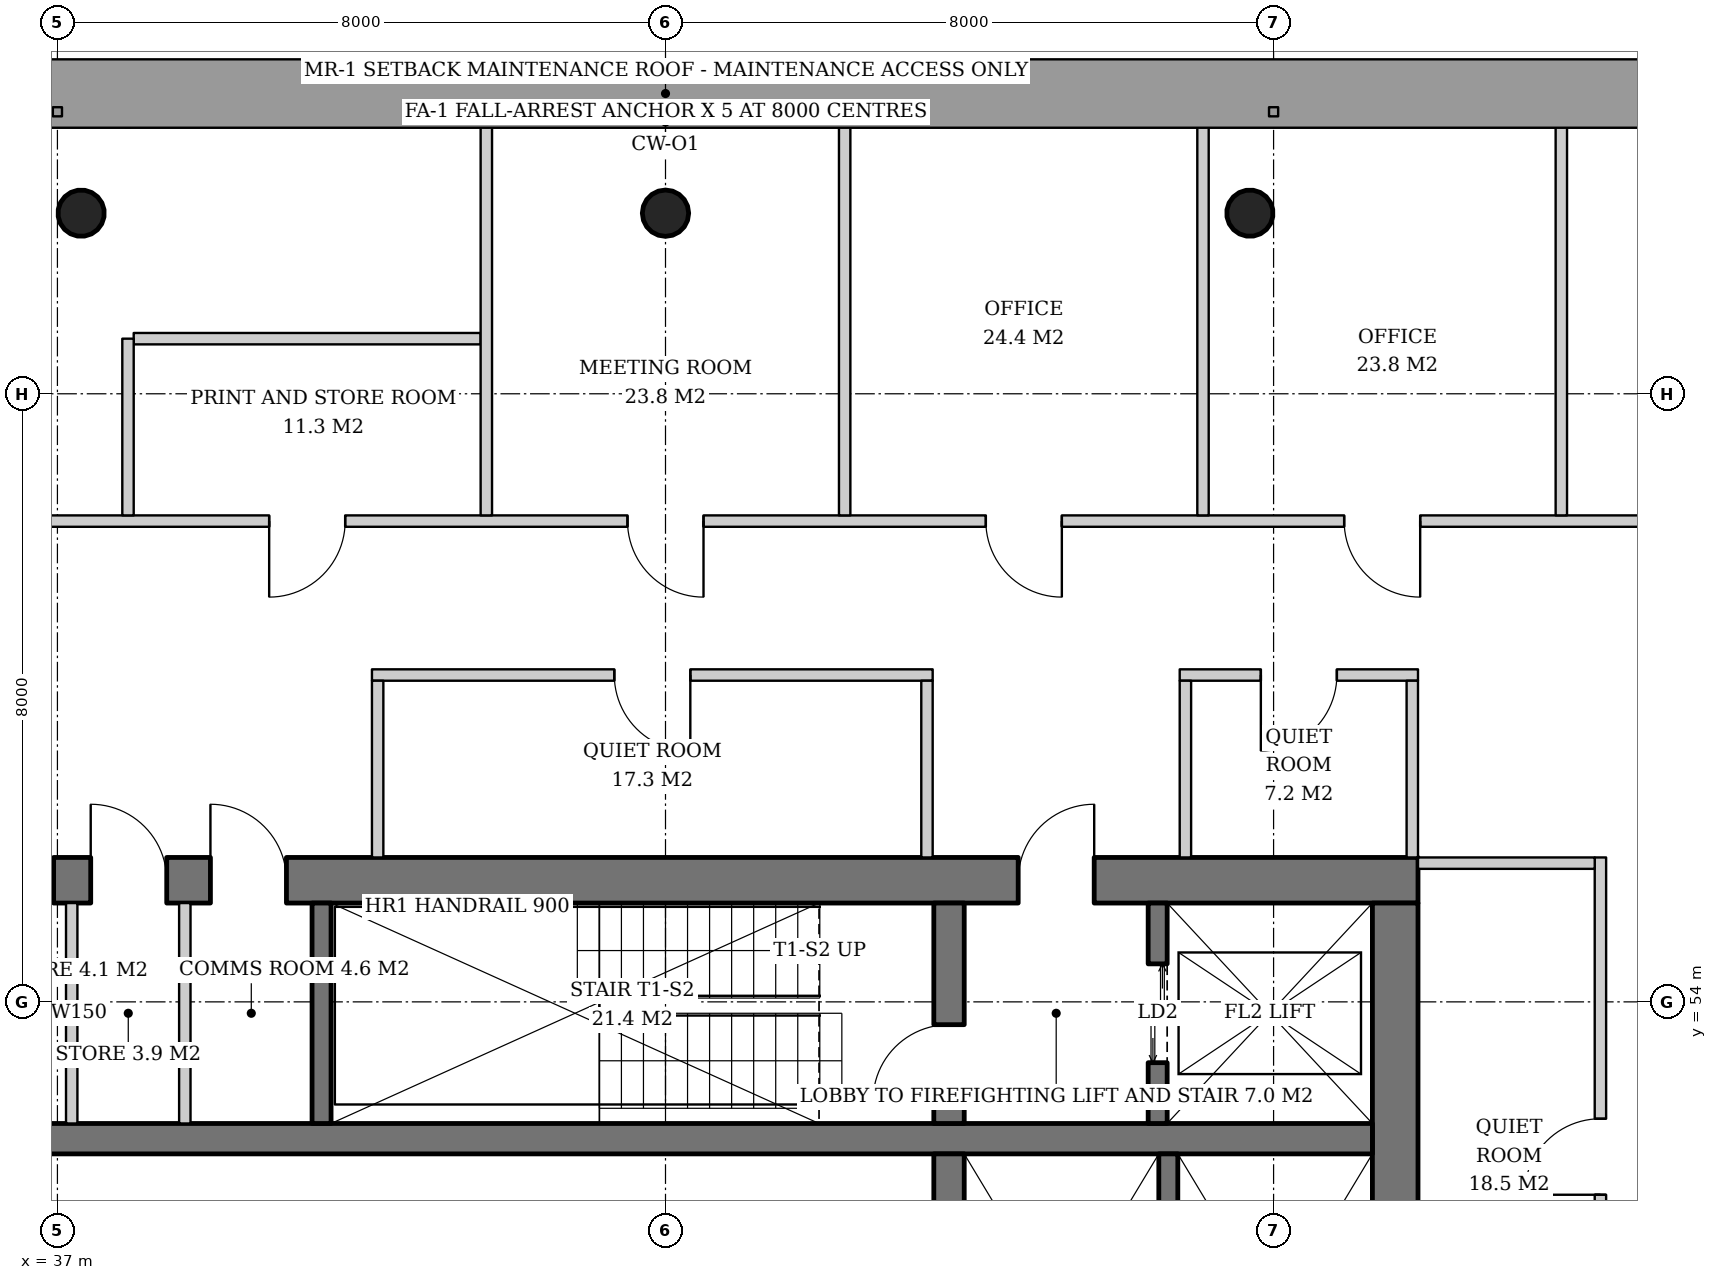
"""IFC4 building model, lengths in metres.
Left out: names, types, materials, properties, quantities, classifications, styles, units other than length and angle.
Written with IfcOpenShell. Run it as: python <this file> out.ifc"""

import sys

from ifc_helpers import new_model, si_unit, direction, frame, frame_2d, origin, origin_2d, place, context, subcontext, project, spatial, rectangle, hollow_circle, extrude, element, fill, save


model = new_model("IFC4")
c1 = context("Model", 3, precision=1e-05, world=origin(), true_north=direction((0.0, 1.0)))
c2 = subcontext(c1, "Body", "Model", "MODEL_VIEW")
j1 = project(units=[si_unit("LENGTHUNIT", "METRE"), si_unit("PLANEANGLEUNIT", "RADIAN")], contexts=[c1])
p1 = place(None, origin())
s1 = spatial("IfcSite", under=j1, at=p1, CompositionType="ELEMENT")
p2 = place(p1, origin())
s2 = spatial("IfcBuilding", under=s1, at=p2, CompositionType="ELEMENT")
p3 = place(p2, frame((0.0, 0.0, 195.8)))
s3 = spatial("IfcBuildingStorey", under=s2, at=p3, CompositionType="ELEMENT", Elevation=195.8)
p4 = place(p3, frame((59.314, 60.314, 0.0), z_axis=(-0.031898107953, -0.031898107953, 0.998981992539), x_axis=(0.707106781187, -0.707106781187, 0.0)))
e1 = element("IfcColumn", 1, at=p4, inside=s3, PredefinedType="COLUMN", context=c2, shape_type="SweptSolid", body=[
    extrude(rectangle(XDim=2.0, YDim=2.0, at=origin_2d()), origin(), (0.0, 0.0, 1.0), 3.804),
])
p5 = place(p3, frame((52.707, 64.414, 0.0), z_axis=(-0.015923048203, -0.031910302246, 0.999363892257), x_axis=(0.894786976326, -0.446493300058, 0.0)))
e2 = element("IfcColumn", 2, at=p5, inside=s3, PredefinedType="COLUMN", context=c2, shape_type="SweptSolid", body=[
    extrude(hollow_circle(Radius=0.305, WallThickness=0.025, at=origin_2d()), origin(), (0.0, 0.0, 1.0), 3.802),
])
p6 = place(p3, frame((45.0, 64.414, 0.0), z_axis=(0.0, -0.031914348339, 0.999490607445), x_axis=(1.0, 0.0, 0.0)))
e3 = element("IfcColumn", 3, at=p6, inside=s3, PredefinedType="COLUMN", context=c2, shape_type="SweptSolid", body=[
    extrude(hollow_circle(Radius=0.305, WallThickness=0.025, at=origin_2d()), origin(), (0.0, 0.0, 1.0), 3.802),
])
p7 = place(p3, frame((37.293, 64.414, 0.0), z_axis=(0.015923048203, -0.031910302246, 0.999363892257), x_axis=(0.894786976326, 0.446493300058, 0.0)))
e4 = element("IfcColumn", 4, at=p7, inside=s3, PredefinedType="COLUMN", context=c2, shape_type="SweptSolid", body=[
    extrude(hollow_circle(Radius=0.305, WallThickness=0.025, at=origin_2d()), origin(), (0.0, 0.0, 1.0), 3.802),
])
p8 = place(p3, frame((35.1, 55.6, 0.0), z_axis=(0.0, 0.0, 1.0), x_axis=(1.0, 0.0, 0.0)))
e5 = element("IfcWall", 5, at=p8, inside=s3, PredefinedType="SHEAR", context=c2, shape_type="SweptSolid", body=[
    extrude(rectangle(XDim=19.8, YDim=0.6, at=frame_2d((9.9, 0.0))), origin(), (0.0, 0.0, 1.0), 3.8),
])
p9 = place(p8, frame((14.54, 0.0, 0.0)))
e6 = element("IfcOpeningElement", 6, at=p9, cuts=e5, PredefinedType="OPENING", context=c2, shape_type="SweptSolid", body=[
    extrude(rectangle(XDim=1.0, YDim=2.1, at=frame_2d((0.5, 1.05))), frame((0.0, 0.31, 0.0), z_axis=(0.0, -1.0, 0.0), x_axis=(1.0, 0.0, 0.0)), (0.0, 0.0, 1.0), 0.62),
])
p10 = place(p8, frame((0.85, 0.0, 0.0)))
e7 = element("IfcOpeningElement", 7, at=p10, cuts=e5, PredefinedType="OPENING", context=c2, shape_type="SweptSolid", body=[
    extrude(rectangle(XDim=1.0, YDim=2.1, at=frame_2d((0.5, 1.05))), frame((0.0, 0.31, 0.0), z_axis=(0.0, -1.0, 0.0), x_axis=(1.0, 0.0, 0.0)), (0.0, 0.0, 1.0), 0.62),
])
p11 = place(p8, frame((2.338, 0.0, 0.0)))
e8 = element("IfcOpeningElement", 8, at=p11, cuts=e5, PredefinedType="OPENING", context=c2, shape_type="SweptSolid", body=[
    extrude(rectangle(XDim=1.0, YDim=2.1, at=frame_2d((0.5, 1.05))), frame((0.0, 0.31, 0.0), z_axis=(0.0, -1.0, 0.0), x_axis=(1.0, 0.0, 0.0)), (0.0, 0.0, 1.0), 0.62),
])
p12 = place(p8, frame((3.913, 0.0, 0.0)))
e9 = element("IfcOpeningElement", 9, at=p12, cuts=e5, PredefinedType="OPENING", context=c2, shape_type="SweptSolid", body=[
    extrude(rectangle(XDim=1.0, YDim=2.1, at=frame_2d((0.5, 1.05))), frame((0.0, 0.31, 0.0), z_axis=(0.0, -1.0, 0.0), x_axis=(1.0, 0.0, 0.0)), (0.0, 0.0, 1.0), 0.62),
])
p13 = place(p3, frame((54.6, 36.7, 0.0), z_axis=(0.0, 0.0, 1.0), x_axis=(0.0, 1.0, 0.0)))
e10 = element("IfcWall", 10, at=p13, inside=s3, PredefinedType="SHEAR", context=c2, shape_type="SweptSolid", body=[
    extrude(rectangle(XDim=18.6, YDim=0.6, at=frame_2d((9.3, 0.0))), origin(), (0.0, 0.0, 1.0), 3.8),
])
p14 = place(p13, frame((8.4, 0.0, 0.0)))
e11 = element("IfcOpeningElement", 11, at=p14, cuts=e10, PredefinedType="OPENING", context=c2, shape_type="SweptSolid", body=[
    extrude(rectangle(XDim=1.8, YDim=2.4, at=frame_2d((0.9, 1.2))), frame((0.0, 0.31, 0.0), z_axis=(0.0, -1.0, 0.0), x_axis=(1.0, 0.0, 0.0)), (0.0, 0.0, 1.0), 0.62),
])
p15 = place(p3, frame((35.7, 52.2, 0.0), z_axis=(0.0, 0.0, 1.0), x_axis=(1.0, 0.0, 0.0)))
e12 = element("IfcWall", 12, at=p15, inside=s3, PredefinedType="SHEAR", context=c2, shape_type="SweptSolid", body=[
    extrude(rectangle(XDim=18.6, YDim=0.4, at=frame_2d((9.3, 0.0))), origin(), (0.0, 0.0, 1.0), 3.8),
])
p16 = place(p3, frame((48.73, 40.0, 0.0), z_axis=(0.0, 0.0, 1.0), x_axis=(0.0, 1.0, 0.0)))
e13 = element("IfcWall", 13, at=p16, inside=s3, PredefinedType="SHEAR", context=c2, shape_type="SweptSolid", body=[
    extrude(rectangle(XDim=12.0, YDim=0.4, at=frame_2d((6.0, 0.0))), origin(), (0.0, 0.0, 1.0), 3.8),
])
p17 = place(p3, frame((48.73, 52.4, 0.0), z_axis=(0.0, 0.0, 1.0), x_axis=(0.0, 1.0, 0.0)))
e14 = element("IfcWall", 14, at=p17, inside=s3, PredefinedType="SHEAR", context=c2, shape_type="SweptSolid", body=[
    extrude(rectangle(XDim=2.9, YDim=0.4, at=frame_2d((1.45, 0.0))), origin(), (0.0, 0.0, 1.0), 3.8),
])
p18 = place(p17, frame((0.3, 0.0, 0.0)))
e15 = element("IfcOpeningElement", 15, at=p18, cuts=e14, PredefinedType="OPENING", context=c2, shape_type="SweptSolid", body=[
    extrude(rectangle(XDim=1.0, YDim=2.1, at=frame_2d((0.5, 1.05))), frame((0.0, 0.21, 0.0), z_axis=(0.0, -1.0, 0.0), x_axis=(1.0, 0.0, 0.0)), (0.0, 0.0, 1.0), 0.42),
])
p19 = place(p3, frame((40.475, 52.4, 0.0), z_axis=(0.0, 0.0, 1.0), x_axis=(0.0, 1.0, 0.0)))
e16 = element("IfcWall", 16, at=p19, inside=s3, PredefinedType="SHEAR", context=c2, shape_type="SweptSolid", body=[
    extrude(rectangle(XDim=2.9, YDim=0.25, at=frame_2d((1.45, 0.0))), origin(), (0.0, 0.0, 1.0), 3.8),
])
p20 = place(p3, frame((51.475, 52.4, 0.0), z_axis=(0.0, 0.0, 1.0), x_axis=(0.0, 1.0, 0.0)))
e17 = element("IfcWall", 17, at=p20, inside=s3, PredefinedType="SHEAR", context=c2, shape_type="SweptSolid", body=[
    extrude(rectangle(XDim=2.9, YDim=0.25, at=frame_2d((1.45, 0.0))), origin(), (0.0, 0.0, 1.0), 3.8),
])
p21 = place(p20, frame((0.8, 0.0, 0.0)))
e18 = element("IfcOpeningElement", 18, at=p21, cuts=e17, PredefinedType="OPENING", context=c2, shape_type="SweptSolid", body=[
    extrude(rectangle(XDim=1.3, YDim=2.2, at=frame_2d((0.65, 1.1))), frame((0.0, 0.135, 0.0), z_axis=(0.0, -1.0, 0.0), x_axis=(1.0, 0.0, 0.0)), (0.0, 0.0, 1.0), 0.27),
])
p22 = place(p3, frame((51.615, 47.75, 0.0), z_axis=(0.0, 0.0, 1.0), x_axis=(0.0, 1.0, 0.0)))
e19 = element("IfcWall", 19, at=p22, inside=s3, PredefinedType="SHEAR", context=c2, shape_type="SweptSolid", body=[
    extrude(rectangle(XDim=4.25, YDim=0.25, at=frame_2d((2.125, 0.0))), origin(), (0.0, 0.0, 1.0), 3.8),
])
for number, where, z_axis, x_axis in (
    (20, (37.188, 52.4, 0.0), (0.0, 0.0, 1.0), (0.0, 1.0, 0.0)),
    (21, (38.676, 52.4, 0.0), (0.0, 0.0, 1.0), (0.0, 1.0, 0.0)),
):
    element("IfcWall", number, at=place(p3, frame(where, z_axis=z_axis, x_axis=x_axis)), inside=s3, PredefinedType="SOLIDWALL", context=c2, shape_type="SweptSolid", body=[
        extrude(rectangle(XDim=2.9, YDim=0.15, at=frame_2d((1.45, 0.0))), origin(), (0.0, 0.0, 1.0), 3.62),
    ])
p23 = place(p3, frame((57.3, 48.025, 0.0), z_axis=(0.0, 0.0, 1.0), x_axis=(0.0, 1.0, 0.0)))
e22 = element("IfcWall", 22, at=p23, inside=s3, PredefinedType="PARTITIONING", context=c2, shape_type="SweptSolid", body=[
    extrude(rectangle(XDim=7.875, YDim=0.15, at=frame_2d((3.938, 0.0))), origin(), (0.0, 0.0, 1.0), 2.867),
])
p24 = place(p23, frame((3.438, 0.0, 0.0)))
e23 = element("IfcOpeningElement", 23, at=p24, cuts=e22, PredefinedType="OPENING", context=c2, shape_type="SweptSolid", body=[
    extrude(rectangle(XDim=1.0, YDim=2.1, at=frame_2d((0.5, 1.05))), frame((0.0, 0.085, 0.0), z_axis=(0.0, -1.0, 0.0), x_axis=(1.0, 0.0, 0.0)), (0.0, 0.0, 1.0), 0.17),
])
p25 = place(p3, frame((54.9, 55.825, 0.0), z_axis=(0.0, 0.0, 1.0), x_axis=(1.0, 0.0, 0.0)))
e24 = element("IfcWall", 24, at=p25, inside=s3, PredefinedType="PARTITIONING", context=c2, shape_type="SweptSolid", body=[
    extrude(rectangle(XDim=2.325, YDim=0.15, at=frame_2d((1.163, 0.0))), origin(), (0.0, 0.0, 1.0), 3.62),
])
p26 = place(p3, frame((54.9, 58.3, 0.0), z_axis=(0.0, 0.0, 1.0), x_axis=(-1.0, 0.0, 0.0)))
e25 = element("IfcWall", 25, at=p26, inside=s3, PredefinedType="PARTITIONING", context=c2, shape_type="SweptSolid", body=[
    extrude(rectangle(XDim=3.135, YDim=0.15, at=frame_2d((1.567, 0.0))), origin(), (0.0, 0.0, 1.0), 2.92),
])
p27 = place(p26, frame((1.067, 0.0, 0.0)))
e26 = element("IfcOpeningElement", 26, at=p27, cuts=e25, PredefinedType="OPENING", context=c2, shape_type="SweptSolid", body=[
    extrude(rectangle(XDim=1.0, YDim=2.1, at=frame_2d((0.5, 1.05))), frame((0.0, 0.085, 0.0), z_axis=(0.0, -1.0, 0.0), x_axis=(1.0, 0.0, 0.0)), (0.0, 0.0, 1.0), 0.17),
])
p28 = place(p3, frame((54.825, 55.9, 0.0), z_axis=(0.0, 0.0, 1.0), x_axis=(0.0, 1.0, 0.0)))
e27 = element("IfcWall", 27, at=p28, inside=s3, PredefinedType="PARTITIONING", context=c2, shape_type="SweptSolid", body=[
    extrude(rectangle(XDim=2.325, YDim=0.15, at=frame_2d((1.163, 0.0))), origin(), (0.0, 0.0, 1.0), 2.867),
])
p29 = place(p3, frame((51.84, 55.9, 0.0), z_axis=(0.0, 0.0, 1.0), x_axis=(0.0, 1.0, 0.0)))
e28 = element("IfcWall", 28, at=p29, inside=s3, PredefinedType="PARTITIONING", context=c2, shape_type="SweptSolid", body=[
    extrude(rectangle(XDim=2.325, YDim=0.15, at=frame_2d((1.163, 0.0))), origin(), (0.0, 0.0, 1.0), 3.62),
])
p30 = place(p3, frame((48.515, 58.3, 0.0), z_axis=(0.0, 0.0, 1.0), x_axis=(-1.0, 0.0, 0.0)))
e29 = element("IfcWall", 29, at=p30, inside=s3, PredefinedType="PARTITIONING", context=c2, shape_type="SweptSolid", body=[
    extrude(rectangle(XDim=7.377, YDim=0.15, at=frame_2d((3.688, 0.0))), origin(), (0.0, 0.0, 1.0), 2.867),
])
p31 = place(p30, frame((3.188, 0.0, 0.0)))
e30 = element("IfcOpeningElement", 30, at=p31, cuts=e29, PredefinedType="OPENING", context=c2, shape_type="SweptSolid", body=[
    extrude(rectangle(XDim=1.0, YDim=2.1, at=frame_2d((0.5, 1.05))), frame((0.0, 0.085, 0.0), z_axis=(0.0, -1.0, 0.0), x_axis=(1.0, 0.0, 0.0)), (0.0, 0.0, 1.0), 0.17),
])
for number, where, z_axis, x_axis in (
    (31, (48.44, 55.9, 0.0), (0.0, 0.0, 1.0), (0.0, 1.0, 0.0)),
    (32, (41.213, 55.9, 0.0), (0.0, 0.0, 1.0), (0.0, 1.0, 0.0)),
):
    element("IfcWall", number, at=place(p3, frame(where, z_axis=z_axis, x_axis=x_axis)), inside=s3, PredefinedType="PARTITIONING", context=c2, shape_type="SweptSolid", body=[
        extrude(rectangle(XDim=2.325, YDim=0.15, at=frame_2d((1.163, 0.0))), origin(), (0.0, 0.0, 1.0), 3.62),
    ])
p32 = place(p3, frame((42.568, 62.725, 0.0), z_axis=(0.0, 0.0, 1.0), x_axis=(-1.0, 0.0, 0.0)))
e33 = element("IfcWall", 33, at=p32, inside=s3, PredefinedType="PARTITIONING", context=c2, shape_type="SweptSolid", body=[
    extrude(rectangle(XDim=4.564, YDim=0.15, at=frame_2d((2.282, 0.0))), origin(), (0.0, 0.0, 1.0), 2.867),
])
p33 = place(p3, frame((57.836, 60.325, 0.0), z_axis=(0.0, 0.0, 1.0), x_axis=(-1.0, 0.0, 0.0)))
e34 = element("IfcWall", 34, at=p33, inside=s3, PredefinedType="PARTITIONING", context=c2, shape_type="SweptSolid", body=[
    extrude(rectangle(XDim=25.671, YDim=0.15, at=frame_2d((12.836, 0.0))), origin(), (0.0, 0.0, 1.0), 2.867),
])
p34 = place(p33, frame((2.907, 0.0, 0.0)))
e35 = element("IfcOpeningElement", 35, at=p34, cuts=e34, PredefinedType="OPENING", context=c2, shape_type="SweptSolid", body=[
    extrude(rectangle(XDim=1.0, YDim=2.1, at=frame_2d((0.5, 1.05))), frame((0.0, 0.085, 0.0), z_axis=(0.0, -1.0, 0.0), x_axis=(1.0, 0.0, 0.0)), (0.0, 0.0, 1.0), 0.17),
])
p35 = place(p33, frame((7.622, 0.0, 0.0)))
e36 = element("IfcOpeningElement", 36, at=p35, cuts=e34, PredefinedType="OPENING", context=c2, shape_type="SweptSolid", body=[
    extrude(rectangle(XDim=1.0, YDim=2.1, at=frame_2d((0.5, 1.05))), frame((0.0, 0.085, 0.0), z_axis=(0.0, -1.0, 0.0), x_axis=(1.0, 0.0, 0.0)), (0.0, 0.0, 1.0), 0.17),
])
p36 = place(p33, frame((12.336, 0.0, 0.0)))
e37 = element("IfcOpeningElement", 37, at=p36, cuts=e34, PredefinedType="OPENING", context=c2, shape_type="SweptSolid", body=[
    extrude(rectangle(XDim=1.0, YDim=2.1, at=frame_2d((0.5, 1.05))), frame((0.0, 0.085, 0.0), z_axis=(0.0, -1.0, 0.0), x_axis=(1.0, 0.0, 0.0)), (0.0, 0.0, 1.0), 0.17),
])
p37 = place(p33, frame((17.05, 0.0, 0.0)))
e38 = element("IfcOpeningElement", 38, at=p37, cuts=e34, PredefinedType="OPENING", context=c2, shape_type="SweptSolid", body=[
    extrude(rectangle(XDim=1.0, YDim=2.1, at=frame_2d((0.5, 1.05))), frame((0.0, 0.085, 0.0), z_axis=(0.0, -1.0, 0.0), x_axis=(1.0, 0.0, 0.0)), (0.0, 0.0, 1.0), 0.17),
])
p38 = place(p33, frame((21.764, 0.0, 0.0)))
e39 = element("IfcOpeningElement", 39, at=p38, cuts=e34, PredefinedType="OPENING", context=c2, shape_type="SweptSolid", body=[
    extrude(rectangle(XDim=1.0, YDim=2.1, at=frame_2d((0.5, 1.05))), frame((0.0, 0.085, 0.0), z_axis=(0.0, -1.0, 0.0), x_axis=(1.0, 0.0, 0.0)), (0.0, 0.0, 1.0), 0.17),
])
for number, where, z_axis, x_axis in (
    (40, (56.786, 60.4, 0.0), (0.0, 0.0, 1.0), (0.0, 1.0, 0.0)),
    (41, (52.072, 60.4, 0.0), (0.0, 0.0, 1.0), (0.0, 1.0, 0.0)),
    (42, (47.357, 60.4, 0.0), (0.0, 0.0, 1.0), (0.0, 1.0, 0.0)),
):
    element("IfcWall", number, at=place(p3, frame(where, z_axis=z_axis, x_axis=x_axis)), inside=s3, PredefinedType="PARTITIONING", context=c2, shape_type="SweptSolid", body=[
        extrude(rectangle(XDim=5.14, YDim=0.15, at=frame_2d((2.57, 0.0))), origin(), (0.0, 0.0, 1.0), 3.12),
    ])
p39 = place(p3, frame((42.643, 60.4, 0.0), z_axis=(0.0, 0.0, 1.0), x_axis=(0.0, 1.0, 0.0)))
e43 = element("IfcWall", 43, at=p39, inside=s3, PredefinedType="PARTITIONING", context=c2, shape_type="SweptSolid", body=[
    extrude(rectangle(XDim=5.14, YDim=0.15, at=frame_2d((2.57, 0.0))), origin(), (0.0, 0.0, 1.0), 2.867),
])
p40 = place(p3, frame((37.928, 60.4, 0.0), z_axis=(0.0, 0.0, 1.0), x_axis=(0.0, 1.0, 0.0)))
e44 = element("IfcWall", 44, at=p40, inside=s3, PredefinedType="PARTITIONING", context=c2, shape_type="SweptSolid", body=[
    extrude(rectangle(XDim=2.325, YDim=0.15, at=frame_2d((1.163, 0.0))), origin(), (0.0, 0.0, 1.0), 3.62),
])
p41 = place(p21, origin())
e45 = element("IfcDoor", 45, at=p41, inside=s3, OperationType="DOUBLE_DOOR_SLIDING", PredefinedType="DOOR", context=c2, shape_type="SweptSolid", body=[
    extrude(rectangle(XDim=1.3, YDim=2.2, at=frame_2d((0.65, 1.1))), frame((0.0, 0.025, 0.0), z_axis=(0.0, -1.0, 0.0), x_axis=(1.0, 0.0, 0.0)), (0.0, 0.0, 1.0), 0.05),
])
fill(e18, e45)
p42 = place(p18, origin())
e46 = element("IfcDoor", 46, at=p42, inside=s3, OperationType="SINGLE_SWING_LEFT", PredefinedType="DOOR", context=c2, shape_type="SweptSolid", body=[
    extrude(rectangle(XDim=1.0, YDim=2.1, at=frame_2d((0.5, 1.05))), frame((0.0, 0.025, 0.0), z_axis=(0.0, -1.0, 0.0), x_axis=(1.0, 0.0, 0.0)), (0.0, 0.0, 1.0), 0.05),
])
fill(e15, e46)
p43 = place(p9, origin())
e47 = element("IfcDoor", 47, at=p43, inside=s3, OperationType="SINGLE_SWING_RIGHT", PredefinedType="DOOR", context=c2, shape_type="SweptSolid", body=[
    extrude(rectangle(XDim=1.0, YDim=2.1, at=frame_2d((0.5, 1.05))), frame((0.0, 0.025, 0.0), z_axis=(0.0, -1.0, 0.0), x_axis=(1.0, 0.0, 0.0)), (0.0, 0.0, 1.0), 0.05),
])
fill(e6, e47)
p44 = place(p10, origin())
e48 = element("IfcDoor", 48, at=p44, inside=s3, OperationType="SINGLE_SWING_LEFT", PredefinedType="DOOR", context=c2, shape_type="SweptSolid", body=[
    extrude(rectangle(XDim=1.0, YDim=2.1, at=frame_2d((0.5, 1.05))), frame((0.0, -0.24, 0.0), z_axis=(0.0, -1.0, 0.0), x_axis=(1.0, 0.0, 0.0)), (0.0, 0.0, 1.0), 0.05),
])
fill(e7, e48)
p45 = place(p11, origin())
e49 = element("IfcDoor", 49, at=p45, inside=s3, OperationType="SINGLE_SWING_LEFT", PredefinedType="DOOR", context=c2, shape_type="SweptSolid", body=[
    extrude(rectangle(XDim=1.0, YDim=2.1, at=frame_2d((0.5, 1.05))), frame((0.0, -0.24, 0.0), z_axis=(0.0, -1.0, 0.0), x_axis=(1.0, 0.0, 0.0)), (0.0, 0.0, 1.0), 0.05),
])
fill(e8, e49)
p46 = place(p12, origin())
e50 = element("IfcDoor", 50, at=p46, inside=s3, OperationType="SINGLE_SWING_LEFT", PredefinedType="DOOR", context=c2, shape_type="SweptSolid", body=[
    extrude(rectangle(XDim=1.0, YDim=2.1, at=frame_2d((0.5, 1.05))), frame((0.0, -0.24, 0.0), z_axis=(0.0, -1.0, 0.0), x_axis=(1.0, 0.0, 0.0)), (0.0, 0.0, 1.0), 0.05),
])
fill(e9, e50)
p47 = place(p24, origin())
e51 = element("IfcDoor", 51, at=p47, inside=s3, OperationType="SINGLE_SWING_LEFT", PredefinedType="DOOR", context=c2, shape_type="SweptSolid", body=[
    extrude(rectangle(XDim=1.0, YDim=2.1, at=frame_2d((0.5, 1.05))), frame((0.0, 0.025, 0.0), z_axis=(0.0, -1.0, 0.0), x_axis=(1.0, 0.0, 0.0)), (0.0, 0.0, 1.0), 0.05),
])
fill(e23, e51)
p48 = place(p27, origin())
e52 = element("IfcDoor", 52, at=p48, inside=s3, OperationType="SINGLE_SWING_RIGHT", PredefinedType="DOOR", context=c2, shape_type="SweptSolid", body=[
    extrude(rectangle(XDim=1.0, YDim=2.1, at=frame_2d((0.5, 1.05))), frame((0.0, 0.025, 0.0), z_axis=(0.0, -1.0, 0.0), x_axis=(1.0, 0.0, 0.0)), (0.0, 0.0, 1.0), 0.05),
])
fill(e26, e52)
p49 = place(p31, origin())
e53 = element("IfcDoor", 53, at=p49, inside=s3, OperationType="SINGLE_SWING_LEFT", PredefinedType="DOOR", context=c2, shape_type="SweptSolid", body=[
    extrude(rectangle(XDim=1.0, YDim=2.1, at=frame_2d((0.5, 1.05))), frame((0.0, 0.025, 0.0), z_axis=(0.0, -1.0, 0.0), x_axis=(1.0, 0.0, 0.0)), (0.0, 0.0, 1.0), 0.05),
])
fill(e30, e53)
p50 = place(p34, origin())
e54 = element("IfcDoor", 54, at=p50, inside=s3, OperationType="SINGLE_SWING_LEFT", PredefinedType="DOOR", context=c2, shape_type="SweptSolid", body=[
    extrude(rectangle(XDim=1.0, YDim=2.1, at=frame_2d((0.5, 1.05))), frame((0.0, 0.025, 0.0), z_axis=(0.0, -1.0, 0.0), x_axis=(1.0, 0.0, 0.0)), (0.0, 0.0, 1.0), 0.05),
])
fill(e35, e54)
p51 = place(p35, origin())
e55 = element("IfcDoor", 55, at=p51, inside=s3, OperationType="SINGLE_SWING_LEFT", PredefinedType="DOOR", context=c2, shape_type="SweptSolid", body=[
    extrude(rectangle(XDim=1.0, YDim=2.1, at=frame_2d((0.5, 1.05))), frame((0.0, 0.025, 0.0), z_axis=(0.0, -1.0, 0.0), x_axis=(1.0, 0.0, 0.0)), (0.0, 0.0, 1.0), 0.05),
])
fill(e36, e55)
p52 = place(p36, origin())
e56 = element("IfcDoor", 56, at=p52, inside=s3, OperationType="SINGLE_SWING_LEFT", PredefinedType="DOOR", context=c2, shape_type="SweptSolid", body=[
    extrude(rectangle(XDim=1.0, YDim=2.1, at=frame_2d((0.5, 1.05))), frame((0.0, 0.025, 0.0), z_axis=(0.0, -1.0, 0.0), x_axis=(1.0, 0.0, 0.0)), (0.0, 0.0, 1.0), 0.05),
])
fill(e37, e56)
p53 = place(p37, origin())
e57 = element("IfcDoor", 57, at=p53, inside=s3, OperationType="SINGLE_SWING_RIGHT", PredefinedType="DOOR", context=c2, shape_type="SweptSolid", body=[
    extrude(rectangle(XDim=1.0, YDim=2.1, at=frame_2d((0.5, 1.05))), frame((0.0, 0.025, 0.0), z_axis=(0.0, -1.0, 0.0), x_axis=(1.0, 0.0, 0.0)), (0.0, 0.0, 1.0), 0.05),
])
fill(e38, e57)
save(model, sys.argv[1])
